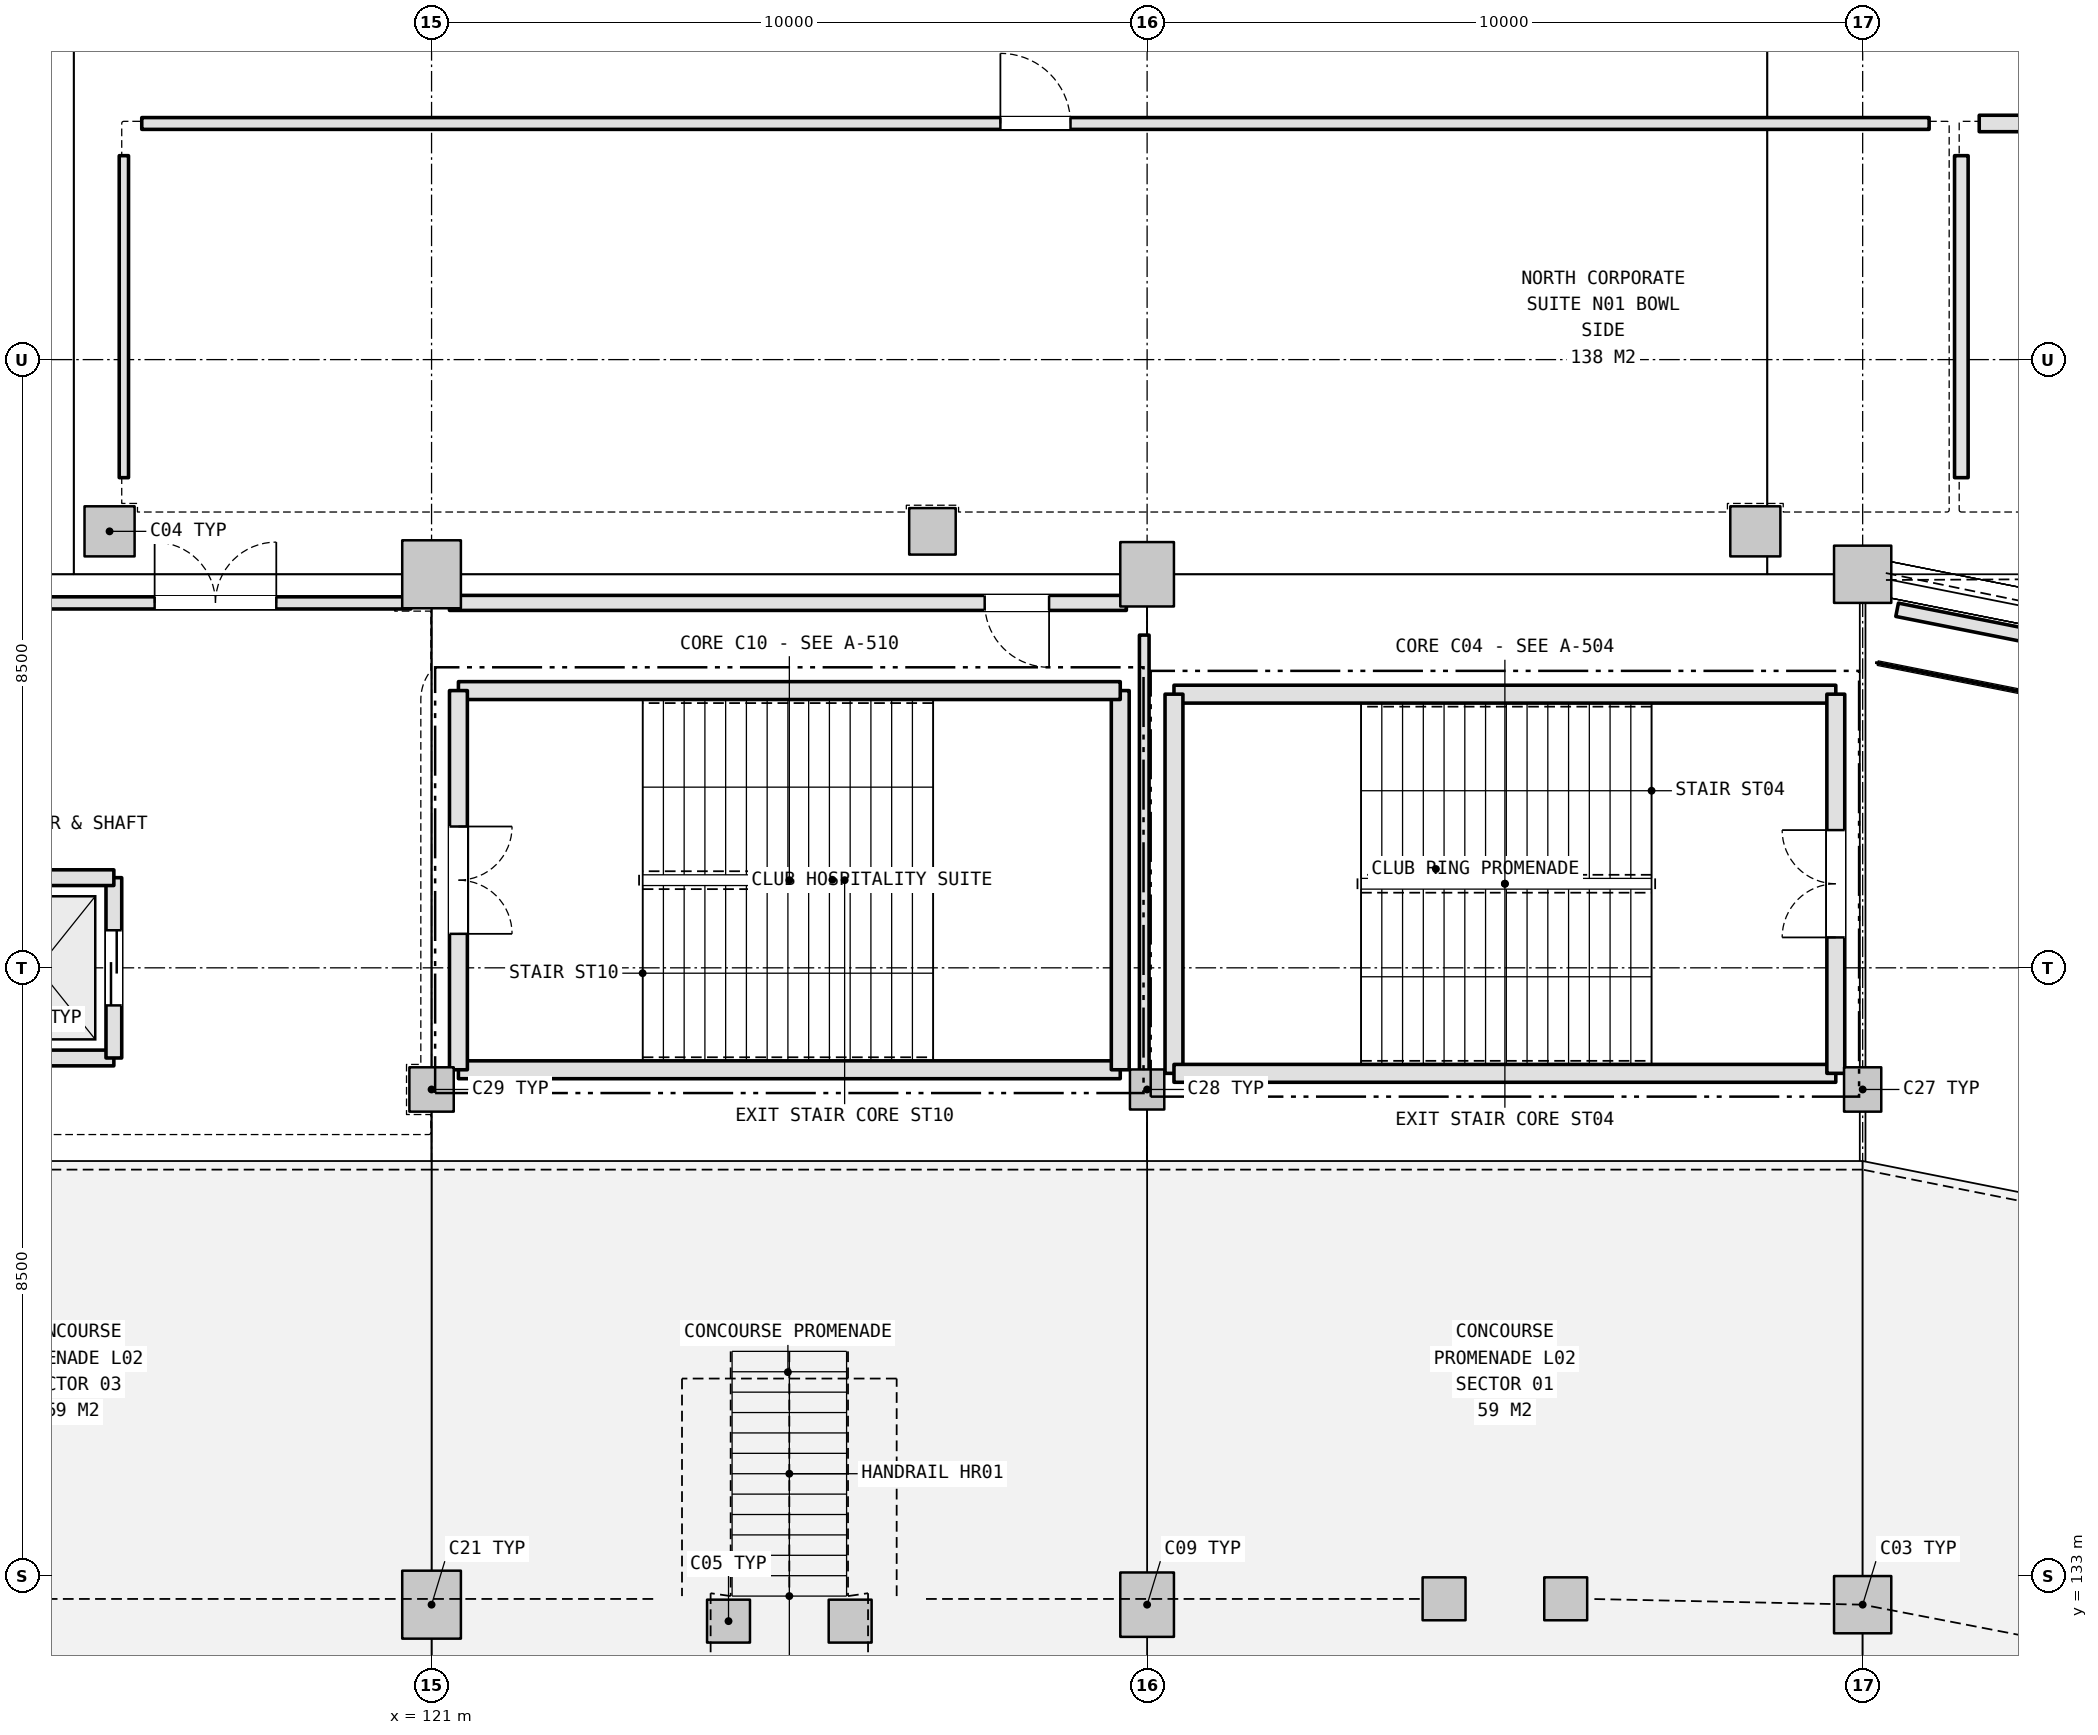
"""IFC4 building model, lengths in metres.
Left out: names, types, materials, properties, quantities, classifications, styles, units other than length and angle.
Written with IfcOpenShell. Run it as: python <this file> out.ifc"""

import sys

from ifc_helpers import new_model, si_unit, direction, frame, frame_2d, origin, origin_2d, place, context, subcontext, project, spatial, rectangle, extrude, element, fill, save


model = new_model("IFC4")
c1 = context("Model", 3, precision=1e-05, world=origin(), true_north=direction((0.0, 1.0)))
c2 = subcontext(c1, "Body", "Model", "MODEL_VIEW")
j1 = project(units=[si_unit("LENGTHUNIT", "METRE"), si_unit("PLANEANGLEUNIT", "RADIAN")], contexts=[c1])
p1 = place(None, origin())
s1 = spatial("IfcSite", under=j1, at=p1, CompositionType="ELEMENT")
p2 = place(p1, origin())
s2 = spatial("IfcBuilding", under=s1, at=p2, CompositionType="ELEMENT")
p3 = place(p2, frame((0.0, 0.0, 10.8)))
s3 = spatial("IfcBuildingStorey", under=s2, at=p3, CompositionType="ELEMENT", Elevation=10.8)
p4 = place(p3, frame((141.0, 132.6, 0.0), z_axis=(0.0, 0.0, 1.0), x_axis=(1.0, 0.0, 0.0)))
e1 = element("IfcColumn", 1, at=p4, inside=s3, PredefinedType="COLUMN", context=c2, shape_type="SweptSolid", body=[
    extrude(rectangle(XDim=0.8, YDim=0.8, at=origin_2d()), origin(), (0.0, 0.0, 1.0), 5.4),
])
p5 = place(p3, frame((141.0, 139.8, 0.0), z_axis=(0.0, 0.0, 1.0), x_axis=(1.0, 0.0, 0.0)))
e2 = element("IfcColumn", 2, at=p5, inside=s3, PredefinedType="COLUMN", context=c2, shape_type="SweptSolid", body=[
    extrude(rectangle(XDim=0.52, YDim=0.62, at=origin_2d()), origin(), (0.0, 0.0, 1.0), 5.4),
])
p6 = place(p3, frame((141.0, 147.0, 0.0), z_axis=(0.0, 0.0, 1.0), x_axis=(1.0, 0.0, 0.0)))
e3 = element("IfcColumn", 3, at=p6, inside=s3, PredefinedType="COLUMN", context=c2, shape_type="SweptSolid", body=[
    extrude(rectangle(XDim=0.8, YDim=0.8, at=origin_2d()), origin(), (0.0, 0.0, 1.0), 5.4),
])
p7 = place(p3, frame((131.0, 132.6, 0.0), z_axis=(0.0, 0.0, 1.0), x_axis=(1.0, 0.0, 0.0)))
e4 = element("IfcColumn", 4, at=p7, inside=s3, PredefinedType="COLUMN", context=c2, shape_type="SweptSolid", body=[
    extrude(rectangle(XDim=0.75, YDim=0.9, at=origin_2d()), origin(), (0.0, 0.0, 1.0), 5.4),
])
p8 = place(p3, frame((131.0, 139.8, 0.0), z_axis=(0.0, 0.0, 1.0), x_axis=(1.0, 0.0, 0.0)))
e5 = element("IfcColumn", 5, at=p8, inside=s3, PredefinedType="COLUMN", context=c2, shape_type="SweptSolid", body=[
    extrude(rectangle(XDim=0.48, YDim=0.56, at=origin_2d()), origin(), (0.0, 0.0, 1.0), 5.4),
])
p9 = place(p3, frame((131.0, 147.0, 0.0), z_axis=(0.0, 0.0, 1.0), x_axis=(1.0, 0.0, 0.0)))
e6 = element("IfcColumn", 6, at=p9, inside=s3, PredefinedType="COLUMN", context=c2, shape_type="SweptSolid", body=[
    extrude(rectangle(XDim=0.75, YDim=0.9, at=origin_2d()), origin(), (0.0, 0.0, 1.0), 5.4),
])
p10 = place(p3, frame((121.0, 132.6, 0.0), z_axis=(0.0, 0.0, 1.0), x_axis=(1.0, 0.0, 0.0)))
e7 = element("IfcColumn", 7, at=p10, inside=s3, PredefinedType="COLUMN", context=c2, shape_type="SweptSolid", body=[
    extrude(rectangle(XDim=0.82, YDim=0.95, at=origin_2d()), origin(), (0.0, 0.0, 1.0), 5.4),
])
p11 = place(p3, frame((121.0, 139.8, 0.0), z_axis=(0.0, 0.0, 1.0), x_axis=(1.0, 0.0, 0.0)))
e8 = element("IfcColumn", 8, at=p11, inside=s3, PredefinedType="COLUMN", context=c2, shape_type="SweptSolid", body=[
    extrude(rectangle(XDim=0.62, YDim=0.62, at=origin_2d()), origin(), (0.0, 0.0, 1.0), 5.4),
])
p12 = place(p3, frame((121.0, 147.0, 0.0), z_axis=(0.0, 0.0, 1.0), x_axis=(1.0, 0.0, 0.0)))
e9 = element("IfcColumn", 9, at=p12, inside=s3, PredefinedType="COLUMN", context=c2, shape_type="SweptSolid", body=[
    extrude(rectangle(XDim=0.82, YDim=0.95, at=origin_2d()), origin(), (0.0, 0.0, 1.0), 5.4),
])
p13 = place(p3, frame((116.5, 147.6, 0.0), z_axis=(0.0, 0.0, 1.0), x_axis=(1.0, 0.0, 0.0)))
e10 = element("IfcColumn", 10, at=p13, inside=s3, PredefinedType="COLUMN", context=c2, shape_type="SweptSolid", body=[
    extrude(rectangle(XDim=0.7, YDim=0.7, at=origin_2d()), origin(), (0.0, 0.0, 1.0), 5.4),
])
p14 = place(p3, frame((128.0, 147.6, 0.0), z_axis=(0.0, 0.0, 1.0), x_axis=(1.0, 0.0, 0.0)))
e11 = element("IfcColumn", 11, at=p14, inside=s3, PredefinedType="COLUMN", context=c2, shape_type="SweptSolid", body=[
    extrude(rectangle(XDim=0.65, YDim=0.65, at=origin_2d()), origin(), (0.0, 0.0, 1.0), 5.4),
])
p15 = place(p3, frame((139.5, 147.6, 0.0), z_axis=(0.0, 0.0, 1.0), x_axis=(1.0, 0.0, 0.0)))
e12 = element("IfcColumn", 12, at=p15, inside=s3, PredefinedType="COLUMN", context=c2, shape_type="SweptSolid", body=[
    extrude(rectangle(XDim=0.7, YDim=0.7, at=origin_2d()), origin(), (0.0, 0.0, 1.0), 5.4),
])
p16 = place(p3, frame((140.625, 145.325, 0.0), z_axis=(0.0, 0.0, 1.0), x_axis=(-1.0, 0.0, 0.0)))
e13 = element("IfcWall", 13, at=p16, inside=s3, PredefinedType="SHEAR", context=c2, shape_type="SweptSolid", body=[
    extrude(rectangle(XDim=9.249, YDim=0.25, at=frame_2d((4.625, 0.0))), origin(), (0.0, 0.0, 1.0), 5.15),
])
p17 = place(p3, frame((131.375, 145.325, 0.0), z_axis=(0.0, 0.0, 1.0), x_axis=(0.0, -1.0, 0.0)))
e14 = element("IfcWall", 14, at=p17, inside=s3, PredefinedType="SHEAR", context=c2, shape_type="SweptSolid", body=[
    extrude(rectangle(XDim=5.299, YDim=0.25, at=frame_2d((2.65, 0.0))), origin(), (0.0, 0.0, 1.0), 5.15),
])
p18 = place(p3, frame((131.375, 140.025, 0.0), z_axis=(0.0, 0.0, 1.0), x_axis=(1.0, 0.0, 0.0)))
e15 = element("IfcWall", 15, at=p18, inside=s3, PredefinedType="SHEAR", context=c2, shape_type="SweptSolid", body=[
    extrude(rectangle(XDim=9.249, YDim=0.25, at=frame_2d((4.625, 0.0))), origin(), (0.0, 0.0, 1.0), 5.15),
])
p19 = place(p3, frame((140.625, 140.025, 0.0), z_axis=(0.0, 0.0, 1.0), x_axis=(0.0, 1.0, 0.0)))
e16 = element("IfcWall", 16, at=p19, inside=s3, PredefinedType="SHEAR", context=c2, shape_type="SweptSolid", body=[
    extrude(rectangle(XDim=5.299, YDim=0.25, at=frame_2d((2.65, 0.0))), origin(), (0.0, 0.0, 1.0), 5.15),
])
p20 = place(p19, frame((1.9, 0.0, 0.0)))
e17 = element("IfcOpeningElement", 17, at=p20, cuts=e16, PredefinedType="OPENING", context=c2, shape_type="SweptSolid", body=[
    extrude(rectangle(XDim=1.5, YDim=2.2, at=frame_2d((0.75, 1.1))), frame((0.0, 0.135, 0.0), z_axis=(0.0, -1.0, 0.0), x_axis=(1.0, 0.0, 0.0)), (0.0, 0.0, 1.0), 0.27),
])
p21 = place(p3, frame((121.375, 140.075, 0.0), z_axis=(0.0, 0.0, 1.0), x_axis=(1.0, 0.0, 0.0)))
e18 = element("IfcWall", 18, at=p21, inside=s3, PredefinedType="SHEAR", context=c2, shape_type="SweptSolid", body=[
    extrude(rectangle(XDim=9.249, YDim=0.25, at=frame_2d((4.625, 0.0))), origin(), (0.0, 0.0, 1.0), 5.15),
])
p22 = place(p3, frame((130.625, 140.075, 0.0), z_axis=(0.0, 0.0, 1.0), x_axis=(0.0, 1.0, 0.0)))
e19 = element("IfcWall", 19, at=p22, inside=s3, PredefinedType="SHEAR", context=c2, shape_type="SweptSolid", body=[
    extrude(rectangle(XDim=5.299, YDim=0.25, at=frame_2d((2.649, 0.0))), origin(), (0.0, 0.0, 1.0), 5.15),
])
p23 = place(p3, frame((130.625, 145.375, 0.0), z_axis=(0.0, 0.0, 1.0), x_axis=(-1.0, 0.0, 0.0)))
e20 = element("IfcWall", 20, at=p23, inside=s3, PredefinedType="SHEAR", context=c2, shape_type="SweptSolid", body=[
    extrude(rectangle(XDim=9.249, YDim=0.25, at=frame_2d((4.625, 0.0))), origin(), (0.0, 0.0, 1.0), 5.15),
])
p24 = place(p3, frame((121.375, 145.375, 0.0), z_axis=(0.0, 0.0, 1.0), x_axis=(0.0, -1.0, 0.0)))
e21 = element("IfcWall", 21, at=p24, inside=s3, PredefinedType="SHEAR", context=c2, shape_type="SweptSolid", body=[
    extrude(rectangle(XDim=5.299, YDim=0.25, at=frame_2d((2.649, 0.0))), origin(), (0.0, 0.0, 1.0), 5.15),
])
p25 = place(p24, frame((1.9, 0.0, 0.0)))
e22 = element("IfcOpeningElement", 22, at=p25, cuts=e21, PredefinedType="OPENING", context=c2, shape_type="SweptSolid", body=[
    extrude(rectangle(XDim=1.5, YDim=2.2, at=frame_2d((0.75, 1.1))), frame((0.0, 0.135, 0.0), z_axis=(0.0, -1.0, 0.0), x_axis=(1.0, 0.0, 0.0)), (0.0, 0.0, 1.0), 0.27),
])
for number, where, z_axis, x_axis in (
    (23, (125.15, 132.37, 0.0), (0.0, 0.0, 1.0), (1.0, 0.0, 0.0)),
    (24, (126.85, 132.37, 0.0), (0.0, 0.0, 1.0), (1.0, 0.0, 0.0)),
):
    element("IfcColumn", number, at=place(p3, frame(where, z_axis=z_axis, x_axis=x_axis)), inside=s3, PredefinedType="COLUMN", context=c2, shape_type="SweptSolid", body=[
        extrude(rectangle(XDim=0.6, YDim=0.6, at=origin_2d()), origin(), (0.0, 0.0, 1.0), 2.04),
    ])
for number, where, z_axis, x_axis in (
    (25, (135.15, 132.682, 0.0), (0.0, 0.0, 1.0), (1.0, 0.0, 0.0)),
    (26, (136.85, 132.682, 0.0), (0.0, 0.0, 1.0), (1.0, 0.0, 0.0)),
):
    element("IfcColumn", number, at=place(p3, frame(where, z_axis=z_axis, x_axis=x_axis)), inside=s3, PredefinedType="COLUMN", context=c2, shape_type="SweptSolid", body=[
        extrude(rectangle(XDim=0.6, YDim=0.6, at=origin_2d()), origin(), (0.0, 0.0, 1.0), 5.4),
    ])
p26 = place(p3, frame((114.44, 140.24, 0.0), z_axis=(0.0, 0.0, 1.0), x_axis=(1.0, 0.0, 0.0)))
e27 = element("IfcWall", 27, at=p26, inside=s3, PredefinedType="SHEAR", context=c2, shape_type="SweptSolid", body=[
    extrude(rectangle(XDim=2.12, YDim=0.22, at=frame_2d((1.06, 0.0))), origin(), (0.0, 0.0, 1.0), 5.15),
])
p27 = place(p3, frame((116.56, 140.24, 0.0), z_axis=(0.0, 0.0, 1.0), x_axis=(0.0, 1.0, 0.0)))
e28 = element("IfcWall", 28, at=p27, inside=s3, PredefinedType="SHEAR", context=c2, shape_type="SweptSolid", body=[
    extrude(rectangle(XDim=2.52, YDim=0.22, at=frame_2d((1.26, 0.0))), origin(), (0.0, 0.0, 1.0), 5.15),
])
p28 = place(p27, frame((0.735, 0.0, 0.0)))
e29 = element("IfcOpeningElement", 29, at=p28, cuts=e28, PredefinedType="OPENING", context=c2, shape_type="SweptSolid", body=[
    extrude(rectangle(XDim=1.05, YDim=2.15, at=frame_2d((0.525, 1.075))), frame((0.0, 0.12, 0.0), z_axis=(0.0, -1.0, 0.0), x_axis=(1.0, 0.0, 0.0)), (0.0, 0.0, 1.0), 0.24),
])
p29 = place(p3, frame((116.56, 142.76, 0.0), z_axis=(0.0, 0.0, 1.0), x_axis=(-1.0, 0.0, 0.0)))
e30 = element("IfcWall", 30, at=p29, inside=s3, PredefinedType="SHEAR", context=c2, shape_type="SweptSolid", body=[
    extrude(rectangle(XDim=2.12, YDim=0.22, at=frame_2d((1.06, 0.0))), origin(), (0.0, 0.0, 1.0), 5.15),
])
p30 = place(p3, frame((116.95, 153.3, 0.0), z_axis=(0.0, 0.0, 1.0), x_axis=(1.0, 0.0, 0.0)))
e31 = element("IfcWall", 31, at=p30, inside=s3, PredefinedType="PARTITIONING", context=c2, shape_type="SweptSolid", body=[
    extrude(rectangle(XDim=24.979, YDim=0.165, at=frame_2d((12.49, 0.0))), origin(), (0.0, 0.0, 1.0), 4.505),
])
p31 = place(p30, frame((12.0, 0.0, 0.0)))
e32 = element("IfcOpeningElement", 32, at=p31, cuts=e31, PredefinedType="OPENING", context=c2, shape_type="SweptSolid", body=[
    extrude(rectangle(XDim=0.98, YDim=2.15, at=frame_2d((0.49, 1.075))), frame((0.0, 0.093, 0.0), z_axis=(0.0, -1.0, 0.0), x_axis=(1.0, 0.0, 0.0)), (0.0, 0.0, 1.0), 0.185),
])
p32 = place(p3, frame((116.7, 148.35, 0.0), z_axis=(0.0, 0.0, 1.0), x_axis=(0.0, 1.0, 0.0)))
e33 = element("IfcWall", 33, at=p32, inside=s3, PredefinedType="PARTITIONING", context=c2, shape_type="SweptSolid", body=[
    extrude(rectangle(XDim=4.5, YDim=0.13, at=frame_2d((2.25, 0.0))), origin(), (0.0, 0.0, 1.0), 4.455),
])
p33 = place(p3, frame((142.629, 153.3, 0.0), z_axis=(0.0, 0.0, 1.0), x_axis=(1.0, 0.0, 0.0)))
e34 = element("IfcWall", 34, at=p33, inside=s3, PredefinedType="PLUMBINGWALL", context=c2, shape_type="SweptSolid", body=[
    extrude(rectangle(XDim=24.979, YDim=0.23, at=frame_2d((12.49, 0.0))), origin(), (0.0, 0.0, 1.0), 4.505),
])
p34 = place(p33, frame((11.929, 0.0, 0.0)))
e35 = element("IfcOpeningElement", 35, at=p34, cuts=e34, PredefinedType="OPENING", context=c2, shape_type="SweptSolid", body=[
    extrude(rectangle(XDim=1.12, YDim=2.2, at=frame_2d((0.56, 1.1))), frame((0.0, 0.125, 0.0), z_axis=(0.0, -1.0, 0.0), x_axis=(1.0, 0.0, 0.0)), (0.0, 0.0, 1.0), 0.25),
])
p35 = place(p3, frame((142.379, 148.35, 0.0), z_axis=(0.0, 0.0, 1.0), x_axis=(0.0, 1.0, 0.0)))
e36 = element("IfcWall", 36, at=p35, inside=s3, PredefinedType="PARTITIONING", context=c2, shape_type="SweptSolid", body=[
    extrude(rectangle(XDim=4.5, YDim=0.19, at=frame_2d((2.25, 0.0))), origin(), (0.0, 0.0, 1.0), 4.655),
])
p36 = place(p3, frame((121.25, 146.6, 0.0), z_axis=(0.0, 0.0, 1.0), x_axis=(1.0, 0.0, 0.0)))
e37 = element("IfcWall", 37, at=p36, inside=s3, PredefinedType="PLUMBINGWALL", context=c2, shape_type="SweptSolid", body=[
    extrude(rectangle(XDim=9.46, YDim=0.21, at=frame_2d((4.73, 0.0))), origin(), (0.0, 0.0, 1.0), 4.255),
])
p37 = place(p36, frame((7.48, 0.0, 0.0)))
e38 = element("IfcOpeningElement", 38, at=p37, cuts=e37, PredefinedType="OPENING", context=c2, shape_type="SweptSolid", body=[
    extrude(rectangle(XDim=0.9, YDim=2.1, at=frame_2d((0.45, 1.05))), frame((0.0, 0.115, 0.0), z_axis=(0.0, -1.0, 0.0), x_axis=(1.0, 0.0, 0.0)), (0.0, 0.0, 1.0), 0.23),
])
p38 = place(p3, frame((130.96, 146.15, 0.0), z_axis=(0.0, 0.0, 1.0), x_axis=(0.0, -1.0, 0.0)))
e39 = element("IfcWall", 39, at=p38, inside=s3, PredefinedType="PARTITIONING", context=c2, shape_type="SweptSolid", body=[
    extrude(rectangle(XDim=6.5, YDim=0.135, at=frame_2d((3.25, 0.0))), origin(), (0.0, 0.0, 1.0), 4.255),
])
p39 = place(p3, frame((111.25, 146.6, 0.0), z_axis=(0.0, 0.0, 1.0), x_axis=(1.0, 0.0, 0.0)))
e40 = element("IfcWall", 40, at=p39, inside=s3, PredefinedType="PARTITIONING", context=c2, shape_type="SweptSolid", body=[
    extrude(rectangle(XDim=9.46, YDim=0.17, at=frame_2d((4.73, 0.0))), origin(), (0.0, 0.0, 1.0), 4.215),
])
p40 = place(p39, frame((5.88, 0.0, 0.0)))
e41 = element("IfcOpeningElement", 41, at=p40, cuts=e40, PredefinedType="OPENING", context=c2, shape_type="SweptSolid", body=[
    extrude(rectangle(XDim=1.7, YDim=2.25, at=frame_2d((0.85, 1.125))), frame((0.0, 0.095, 0.0), z_axis=(0.0, -1.0, 0.0), x_axis=(1.0, 0.0, 0.0)), (0.0, 0.0, 1.0), 0.19),
])
p41 = place(p3, frame((141.481, 146.504, 0.0), z_axis=(0.0, 0.0, 1.0), x_axis=(0.980785084589, -0.195091306436, 0.0)))
e42 = element("IfcWall", 42, at=p41, inside=s3, PredefinedType="PARTITIONING", context=c2, shape_type="SweptSolid", body=[
    extrude(rectangle(XDim=19.152, YDim=0.19, at=frame_2d((9.576, 0.0))), origin(), (0.0, 0.0, 1.0), 5.12),
])
p42 = place(p20, origin())
e43 = element("IfcDoor", 43, at=p42, inside=s3, OperationType="DOUBLE_DOOR_SINGLE_SWING", PredefinedType="DOOR", context=c2, shape_type="SweptSolid", body=[
    extrude(rectangle(XDim=1.5, YDim=2.2, at=frame_2d((0.75, 1.1))), frame((0.0, 0.025, 0.0), z_axis=(0.0, -1.0, 0.0), x_axis=(1.0, 0.0, 0.0)), (0.0, 0.0, 1.0), 0.05),
])
fill(e17, e43)
p43 = place(p25, origin())
e44 = element("IfcDoor", 44, at=p43, inside=s3, OperationType="DOUBLE_DOOR_SINGLE_SWING", PredefinedType="DOOR", context=c2, shape_type="SweptSolid", body=[
    extrude(rectangle(XDim=1.5, YDim=2.2, at=frame_2d((0.75, 1.1))), frame((0.0, 0.025, 0.0), z_axis=(0.0, -1.0, 0.0), x_axis=(1.0, 0.0, 0.0)), (0.0, 0.0, 1.0), 0.05),
])
fill(e22, e44)
p44 = place(p28, origin())
e45 = element("IfcDoor", 45, at=p44, inside=s3, OperationType="DOUBLE_DOOR_SLIDING", PredefinedType="DOOR", context=c2, shape_type="SweptSolid", body=[
    extrude(rectangle(XDim=1.05, YDim=2.15, at=frame_2d((0.525, 1.075))), frame((0.0, 0.025, 0.0), z_axis=(0.0, -1.0, 0.0), x_axis=(1.0, 0.0, 0.0)), (0.0, 0.0, 1.0), 0.05),
])
fill(e29, e45)
p45 = place(p31, origin())
e46 = element("IfcDoor", 46, at=p45, inside=s3, OperationType="SINGLE_SWING_LEFT", PredefinedType="DOOR", context=c2, shape_type="SweptSolid", body=[
    extrude(rectangle(XDim=0.98, YDim=2.15, at=frame_2d((0.49, 1.075))), frame((0.0, 0.025, 0.0), z_axis=(0.0, -1.0, 0.0), x_axis=(1.0, 0.0, 0.0)), (0.0, 0.0, 1.0), 0.05),
])
fill(e32, e46)
p46 = place(p37, frame((0.9, 0.0, 0.0), z_axis=(0.0, 0.0, 1.0), x_axis=(-1.0, 0.0, 0.0)))
e47 = element("IfcDoor", 47, at=p46, inside=s3, OperationType="SINGLE_SWING_RIGHT", PredefinedType="DOOR", context=c2, shape_type="SweptSolid", body=[
    extrude(rectangle(XDim=0.9, YDim=2.1, at=frame_2d((0.45, 1.05))), frame((0.0, 0.025, 0.0), z_axis=(0.0, -1.0, 0.0), x_axis=(1.0, 0.0, 0.0)), (0.0, 0.0, 1.0), 0.05),
])
fill(e38, e47)
p47 = place(p40, origin())
e48 = element("IfcDoor", 48, at=p47, inside=s3, OperationType="DOUBLE_DOOR_SINGLE_SWING", PredefinedType="DOOR", context=c2, shape_type="SweptSolid", body=[
    extrude(rectangle(XDim=1.7, YDim=2.25, at=frame_2d((0.85, 1.125))), frame((0.0, 0.025, 0.0), z_axis=(0.0, -1.0, 0.0), x_axis=(1.0, 0.0, 0.0)), (0.0, 0.0, 1.0), 0.05),
])
fill(e41, e48)
save(model, sys.argv[1])
